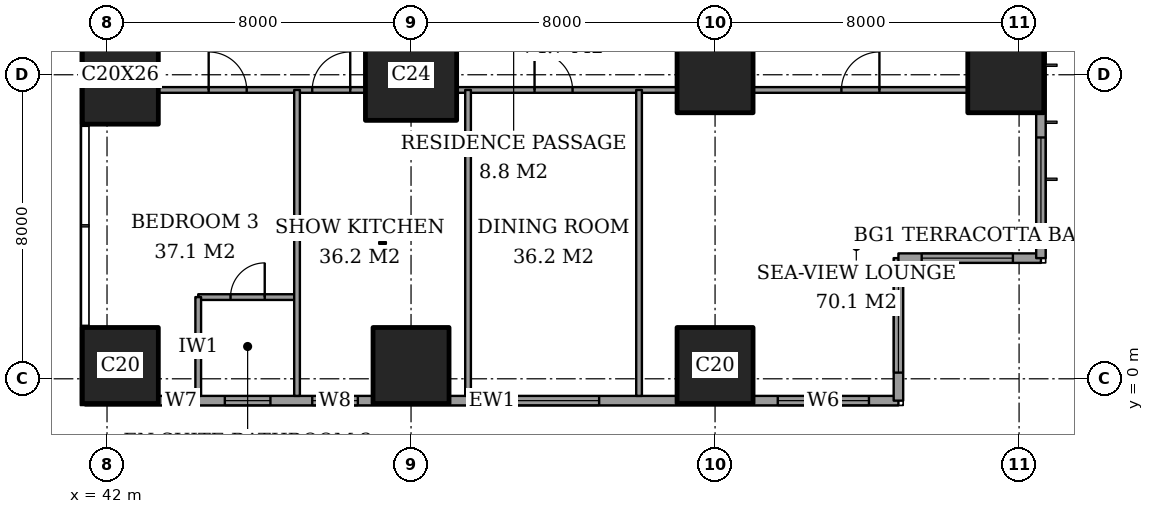
"""IFC4 building model, lengths in metres.
Left out: names, types, materials, properties, quantities, classifications, styles, units other than length and angle.
Written with IfcOpenShell. Run it as: python <this file> out.ifc"""

import sys

from ifc_helpers import new_model, si_unit, direction, frame, frame_2d, origin, origin_2d, place, context, subcontext, project, spatial, rectangle, extrude, element, fill, save


model = new_model("IFC4")
c1 = context("Model", 3, precision=1e-05, world=origin(), true_north=direction((0.0, 1.0)))
c2 = subcontext(c1, "Body", "Model", "MODEL_VIEW")
j1 = project(units=[si_unit("LENGTHUNIT", "METRE"), si_unit("PLANEANGLEUNIT", "RADIAN")], contexts=[c1])
p1 = place(None, origin())
s1 = spatial("IfcSite", under=j1, at=p1, CompositionType="ELEMENT")
p2 = place(p1, origin())
s2 = spatial("IfcBuilding", under=s1, at=p2, CompositionType="ELEMENT")
p3 = place(p2, frame((0.0, 0.0, 29.6)))
s3 = spatial("IfcBuildingStorey", under=s2, at=p3, CompositionType="ELEMENT", Elevation=29.6)
p4 = place(p3, frame((42.35, 0.35, 0.0), z_axis=(0.0, 0.0, 1.0), x_axis=(1.0, 0.0, 0.0)))
e1 = element("IfcColumn", 1, at=p4, inside=s3, PredefinedType="COLUMN", context=c2, shape_type="SweptSolid", body=[
    extrude(rectangle(XDim=2.0, YDim=2.0, at=origin_2d()), origin(), (0.0, 0.0, 1.0), 3.6),
])
p5 = place(p3, frame((42.35, 8.0, 0.0), z_axis=(0.0, 0.0, 1.0), x_axis=(1.0, 0.0, 0.0)))
e2 = element("IfcColumn", 2, at=p5, inside=s3, PredefinedType="COLUMN", context=c2, shape_type="SweptSolid", body=[
    extrude(rectangle(XDim=2.0, YDim=2.6, at=origin_2d()), origin(), (0.0, 0.0, 1.0), 3.6),
])
p6 = place(p3, frame((50.0, 0.35, 0.0), z_axis=(0.0, 0.0, 1.0), x_axis=(1.0, 0.0, 0.0)))
e3 = element("IfcColumn", 3, at=p6, inside=s3, PredefinedType="COLUMN", context=c2, shape_type="SweptSolid", body=[
    extrude(rectangle(XDim=2.0, YDim=2.0, at=origin_2d()), origin(), (0.0, 0.0, 1.0), 3.6),
])
p7 = place(p3, frame((50.0, 8.0, 0.0), z_axis=(0.0, 0.0, 1.0), x_axis=(1.0, 0.0, 0.0)))
e4 = element("IfcColumn", 4, at=p7, inside=s3, PredefinedType="COLUMN", context=c2, shape_type="SweptSolid", body=[
    extrude(rectangle(XDim=2.4, YDim=2.4, at=origin_2d()), origin(), (0.0, 0.0, 1.0), 3.6),
])
for number, where, z_axis, x_axis in (
    (5, (58.0, 0.35, 0.0), (0.0, 0.0, 1.0), (1.0, 0.0, 0.0)),
    (6, (58.0, 8.0, 0.0), (0.0, 0.0, 1.0), (1.0, 0.0, 0.0)),
    (7, (65.65, 8.0, 0.0), (0.0, 0.0, 1.0), (1.0, 0.0, 0.0)),
):
    element("IfcColumn", number, at=place(p3, frame(where, z_axis=z_axis, x_axis=x_axis)), inside=s3, PredefinedType="COLUMN", context=c2, shape_type="SweptSolid", body=[
        extrude(rectangle(XDim=2.0, YDim=2.0, at=origin_2d()), origin(), (0.0, 0.0, 1.0), 3.6),
    ])
p8 = place(p3, frame((41.425, -0.575, 0.0), z_axis=(0.0, 0.0, 1.0), x_axis=(1.0, 0.0, 0.0)))
e8 = element("IfcWall", 8, at=p8, inside=s3, PredefinedType="SOLIDWALL", context=c2, shape_type="SweptSolid", body=[
    extrude(rectangle(XDim=21.4, YDim=0.25, at=frame_2d((10.7, 0.0))), origin(), (0.0, 0.0, 1.0), 3.6),
])
p9 = place(p8, frame((2.225, 0.0, 0.6)))
e9 = element("IfcOpeningElement", 9, at=p9, cuts=e8, PredefinedType="OPENING", context=c2, shape_type="SweptSolid", body=[
    extrude(rectangle(XDim=0.6, YDim=2.0, at=frame_2d((0.3, 1.0))), frame((0.0, 0.135, 0.0), z_axis=(0.0, -1.0, 0.0), x_axis=(1.0, 0.0, 0.0)), (0.0, 0.0, 1.0), 0.27),
])
p10 = place(p8, frame((3.675, 0.0, 0.6)))
e10 = element("IfcOpeningElement", 10, at=p10, cuts=e8, PredefinedType="OPENING", context=c2, shape_type="SweptSolid", body=[
    extrude(rectangle(XDim=1.2, YDim=2.0, at=frame_2d((0.6, 1.0))), frame((0.0, 0.135, 0.0), z_axis=(0.0, -1.0, 0.0), x_axis=(1.0, 0.0, 0.0)), (0.0, 0.0, 1.0), 0.27),
])
p11 = place(p8, frame((5.975, 0.0, 0.6)))
e11 = element("IfcOpeningElement", 11, at=p11, cuts=e8, PredefinedType="OPENING", context=c2, shape_type="SweptSolid", body=[
    extrude(rectangle(XDim=1.2, YDim=2.0, at=frame_2d((0.6, 1.0))), frame((0.0, 0.135, 0.0), z_axis=(0.0, -1.0, 0.0), x_axis=(1.0, 0.0, 0.0)), (0.0, 0.0, 1.0), 0.27),
])
p12 = place(p8, frame((11.125, 0.0, 0.6)))
e12 = element("IfcOpeningElement", 12, at=p12, cuts=e8, PredefinedType="OPENING", context=c2, shape_type="SweptSolid", body=[
    extrude(rectangle(XDim=2.4, YDim=2.0, at=frame_2d((1.2, 1.0))), frame((0.0, 0.135, 0.0), z_axis=(0.0, -1.0, 0.0), x_axis=(1.0, 0.0, 0.0)), (0.0, 0.0, 1.0), 0.27),
])
p13 = place(p8, frame((18.225, 0.0, 0.6)))
e13 = element("IfcOpeningElement", 13, at=p13, cuts=e8, PredefinedType="OPENING", context=c2, shape_type="SweptSolid", body=[
    extrude(rectangle(XDim=2.4, YDim=2.0, at=frame_2d((1.2, 1.0))), frame((0.0, 0.135, 0.0), z_axis=(0.0, -1.0, 0.0), x_axis=(1.0, 0.0, 0.0)), (0.0, 0.0, 1.0), 0.27),
])
p14 = place(p3, frame((62.825, -0.575, 0.0), z_axis=(0.0, 0.0, 1.0), x_axis=(0.0, 1.0, 0.0)))
e14 = element("IfcWall", 14, at=p14, inside=s3, PredefinedType="SOLIDWALL", context=c2, shape_type="SweptSolid", body=[
    extrude(rectangle(XDim=3.75, YDim=0.25, at=frame_2d((1.875, 0.0))), origin(), (0.0, 0.0, 1.0), 3.6),
])
p15 = place(p14, frame((0.738, 0.0, 0.6)))
e15 = element("IfcOpeningElement", 15, at=p15, cuts=e14, PredefinedType="OPENING", context=c2, shape_type="SweptSolid", body=[
    extrude(rectangle(XDim=2.4, YDim=2.0, at=frame_2d((1.2, 1.0))), frame((0.0, 0.135, 0.0), z_axis=(0.0, -1.0, 0.0), x_axis=(1.0, 0.0, 0.0)), (0.0, 0.0, 1.0), 0.27),
])
p16 = place(p3, frame((62.825, 3.175, 0.0), z_axis=(0.0, 0.0, 1.0), x_axis=(1.0, 0.0, 0.0)))
e16 = element("IfcWall", 16, at=p16, inside=s3, PredefinedType="SOLIDWALL", context=c2, shape_type="SweptSolid", body=[
    extrude(rectangle(XDim=3.75, YDim=0.25, at=frame_2d((1.875, 0.0))), origin(), (0.0, 0.0, 1.0), 3.6),
])
p17 = place(p16, frame((0.613, 0.0, 0.6)))
e17 = element("IfcOpeningElement", 17, at=p17, cuts=e16, PredefinedType="OPENING", context=c2, shape_type="SweptSolid", body=[
    extrude(rectangle(XDim=2.4, YDim=2.0, at=frame_2d((1.2, 1.0))), frame((0.0, 0.135, 0.0), z_axis=(0.0, -1.0, 0.0), x_axis=(1.0, 0.0, 0.0)), (0.0, 0.0, 1.0), 0.27),
])
p18 = place(p3, frame((66.575, 3.175, 0.0), z_axis=(0.0, 0.0, 1.0), x_axis=(0.0, 1.0, 0.0)))
e18 = element("IfcWall", 18, at=p18, inside=s3, PredefinedType="SOLIDWALL", context=c2, shape_type="SweptSolid", body=[
    extrude(rectangle(XDim=41.65, YDim=0.25, at=frame_2d((20.825, 0.0))), origin(), (0.0, 0.0, 1.0), 3.6),
])
p19 = place(p18, frame((0.775, 0.0, 0.6)))
e19 = element("IfcOpeningElement", 19, at=p19, cuts=e18, PredefinedType="OPENING", context=c2, shape_type="SweptSolid", body=[
    extrude(rectangle(XDim=2.4, YDim=2.0, at=frame_2d((1.2, 1.0))), frame((0.0, 0.135, 0.0), z_axis=(0.0, -1.0, 0.0), x_axis=(1.0, 0.0, 0.0)), (0.0, 0.0, 1.0), 0.27),
])
p20 = place(p18, frame((6.1, 0.0, 0.6)))
e20 = element("IfcOpeningElement", 20, at=p20, cuts=e18, PredefinedType="OPENING", context=c2, shape_type="SweptSolid", body=[
    extrude(rectangle(XDim=1.2, YDim=2.0, at=frame_2d((0.6, 1.0))), frame((0.0, 0.135, 0.0), z_axis=(0.0, -1.0, 0.0), x_axis=(1.0, 0.0, 0.0)), (0.0, 0.0, 1.0), 0.27),
])
p21 = place(p18, frame((8.275, 0.0, 0.6)))
e21 = element("IfcOpeningElement", 21, at=p21, cuts=e18, PredefinedType="OPENING", context=c2, shape_type="SweptSolid", body=[
    extrude(rectangle(XDim=2.4, YDim=2.0, at=frame_2d((1.2, 1.0))), frame((0.0, 0.135, 0.0), z_axis=(0.0, -1.0, 0.0), x_axis=(1.0, 0.0, 0.0)), (0.0, 0.0, 1.0), 0.27),
])
p22 = place(p18, frame((15.775, 0.0, 0.6)))
e22 = element("IfcOpeningElement", 22, at=p22, cuts=e18, PredefinedType="OPENING", context=c2, shape_type="SweptSolid", body=[
    extrude(rectangle(XDim=2.4, YDim=2.0, at=frame_2d((1.2, 1.0))), frame((0.0, 0.135, 0.0), z_axis=(0.0, -1.0, 0.0), x_axis=(1.0, 0.0, 0.0)), (0.0, 0.0, 1.0), 0.27),
])
p23 = place(p18, frame((23.475, 0.0, 0.6)))
e23 = element("IfcOpeningElement", 23, at=p23, cuts=e18, PredefinedType="OPENING", context=c2, shape_type="SweptSolid", body=[
    extrude(rectangle(XDim=2.4, YDim=2.0, at=frame_2d((1.2, 1.0))), frame((0.0, 0.135, 0.0), z_axis=(0.0, -1.0, 0.0), x_axis=(1.0, 0.0, 0.0)), (0.0, 0.0, 1.0), 0.27),
])
p24 = place(p18, frame((30.975, 0.0, 0.6)))
e24 = element("IfcOpeningElement", 24, at=p24, cuts=e18, PredefinedType="OPENING", context=c2, shape_type="SweptSolid", body=[
    extrude(rectangle(XDim=2.4, YDim=2.0, at=frame_2d((1.2, 1.0))), frame((0.0, 0.135, 0.0), z_axis=(0.0, -1.0, 0.0), x_axis=(1.0, 0.0, 0.0)), (0.0, 0.0, 1.0), 0.27),
])
p25 = place(p18, frame((34.5, 0.0, 0.6)))
e25 = element("IfcOpeningElement", 25, at=p25, cuts=e18, PredefinedType="OPENING", context=c2, shape_type="SweptSolid", body=[
    extrude(rectangle(XDim=1.2, YDim=2.0, at=frame_2d((0.6, 1.0))), frame((0.0, 0.135, 0.0), z_axis=(0.0, -1.0, 0.0), x_axis=(1.0, 0.0, 0.0)), (0.0, 0.0, 1.0), 0.27),
])
p26 = place(p18, frame((38.475, 0.0, 0.6)))
e26 = element("IfcOpeningElement", 26, at=p26, cuts=e18, PredefinedType="OPENING", context=c2, shape_type="SweptSolid", body=[
    extrude(rectangle(XDim=2.4, YDim=2.0, at=frame_2d((1.2, 1.0))), frame((0.0, 0.135, 0.0), z_axis=(0.0, -1.0, 0.0), x_axis=(1.0, 0.0, 0.0)), (0.0, 0.0, 1.0), 0.27),
])
p27 = place(p3, frame((44.4, 2.15, 0.0), z_axis=(0.0, 0.0, 1.0), x_axis=(1.0, 0.0, 0.0)))
e27 = element("IfcWall", 27, at=p27, inside=s3, PredefinedType="PARTITIONING", context=c2, shape_type="SweptSolid", body=[
    extrude(rectangle(XDim=2.6, YDim=0.15, at=frame_2d((1.3, 0.0))), origin(), (0.0, 0.0, 1.0), 3.35),
])
p28 = place(p27, frame((0.85, 0.0, 0.0)))
e28 = element("IfcOpeningElement", 28, at=p28, cuts=e27, PredefinedType="OPENING", context=c2, shape_type="SweptSolid", body=[
    extrude(rectangle(XDim=0.9, YDim=2.1, at=frame_2d((0.45, 1.05))), frame((0.0, 0.085, 0.0), z_axis=(0.0, -1.0, 0.0), x_axis=(1.0, 0.0, 0.0)), (0.0, 0.0, 1.0), 0.17),
])
p29 = place(p3, frame((43.35, 7.6, 0.0), z_axis=(0.0, 0.0, 1.0), x_axis=(1.0, 0.0, 0.0)))
e29 = element("IfcWall", 29, at=p29, inside=s3, PredefinedType="PARTITIONING", context=c2, shape_type="SweptSolid", body=[
    extrude(rectangle(XDim=5.45, YDim=0.15, at=frame_2d((2.725, 0.0))), origin(), (0.0, 0.0, 1.0), 3.35),
])
p30 = place(p29, frame((4.05, 0.0, 0.0)))
e30 = element("IfcOpeningElement", 30, at=p30, cuts=e29, PredefinedType="OPENING", context=c2, shape_type="SweptSolid", body=[
    extrude(rectangle(XDim=1.0, YDim=2.1, at=frame_2d((0.5, 1.05))), frame((0.0, 0.085, 0.0), z_axis=(0.0, -1.0, 0.0), x_axis=(1.0, 0.0, 0.0)), (0.0, 0.0, 1.0), 0.17),
])
p31 = place(p29, frame((1.325, 0.0, 0.0)))
e31 = element("IfcOpeningElement", 31, at=p31, cuts=e29, PredefinedType="OPENING", context=c2, shape_type="SweptSolid", body=[
    extrude(rectangle(XDim=1.0, YDim=2.1, at=frame_2d((0.5, 1.05))), frame((0.0, 0.085, 0.0), z_axis=(0.0, -1.0, 0.0), x_axis=(1.0, 0.0, 0.0)), (0.0, 0.0, 1.0), 0.17),
])
p32 = place(p3, frame((51.2, 7.6, 0.0), z_axis=(0.0, 0.0, 1.0), x_axis=(1.0, 0.0, 0.0)))
e32 = element("IfcWall", 32, at=p32, inside=s3, PredefinedType="PARTITIONING", context=c2, shape_type="SweptSolid", body=[
    extrude(rectangle(XDim=5.8, YDim=0.15, at=frame_2d((2.9, 0.0))), origin(), (0.0, 0.0, 1.0), 3.35),
])
p33 = place(p32, frame((2.05, 0.0, 0.0)))
e33 = element("IfcOpeningElement", 33, at=p33, cuts=e32, PredefinedType="OPENING", context=c2, shape_type="SweptSolid", body=[
    extrude(rectangle(XDim=1.0, YDim=2.1, at=frame_2d((0.5, 1.05))), frame((0.0, 0.085, 0.0), z_axis=(0.0, -1.0, 0.0), x_axis=(1.0, 0.0, 0.0)), (0.0, 0.0, 1.0), 0.17),
])
p34 = place(p3, frame((59.0, 7.6, 0.0), z_axis=(0.0, 0.0, 1.0), x_axis=(1.0, 0.0, 0.0)))
e34 = element("IfcWall", 34, at=p34, inside=s3, PredefinedType="PARTITIONING", context=c2, shape_type="SweptSolid", body=[
    extrude(rectangle(XDim=5.65, YDim=0.15, at=frame_2d((2.825, 0.0))), origin(), (0.0, 0.0, 1.0), 3.35),
])
p35 = place(p34, frame((2.325, 0.0, 0.0)))
e35 = element("IfcOpeningElement", 35, at=p35, cuts=e34, PredefinedType="OPENING", context=c2, shape_type="SweptSolid", body=[
    extrude(rectangle(XDim=1.0, YDim=2.1, at=frame_2d((0.5, 1.05))), frame((0.0, 0.085, 0.0), z_axis=(0.0, -1.0, 0.0), x_axis=(1.0, 0.0, 0.0)), (0.0, 0.0, 1.0), 0.17),
])
p36 = place(p3, frame((44.4, -0.45, 0.0), z_axis=(0.0, 0.0, 1.0), x_axis=(0.0, 1.0, 0.0)))
e36 = element("IfcWall", 36, at=p36, inside=s3, PredefinedType="PARTITIONING", context=c2, shape_type="SweptSolid", body=[
    extrude(rectangle(XDim=2.6, YDim=0.15, at=frame_2d((1.3, 0.0))), origin(), (0.0, 0.0, 1.0), 3.35),
])
for number, where, z_axis, x_axis in (
    (37, (47.0, -0.45, 0.0), (0.0, 0.0, 1.0), (0.0, 1.0, 0.0)),
    (38, (51.5, -0.45, 0.0), (0.0, 0.0, 1.0), (0.0, 1.0, 0.0)),
    (39, (56.0, -0.45, 0.0), (0.0, 0.0, 1.0), (0.0, 1.0, 0.0)),
):
    element("IfcWall", number, at=place(p3, frame(where, z_axis=z_axis, x_axis=x_axis)), inside=s3, PredefinedType="PARTITIONING", context=c2, shape_type="SweptSolid", body=[
        extrude(rectangle(XDim=8.05, YDim=0.15, at=frame_2d((4.025, 0.0))), origin(), (0.0, 0.0, 1.0), 3.35),
    ])
p37 = place(p9, origin())
e40 = element("IfcWindow", 40, at=p37, inside=s3, PartitioningType="SINGLE_PANEL", PredefinedType="WINDOW", context=c2, shape_type="SweptSolid", body=[
    extrude(rectangle(XDim=0.6, YDim=2.0, at=frame_2d((0.3, 1.0))), frame((0.0, 0.03, 0.0), z_axis=(0.0, -1.0, 0.0), x_axis=(1.0, 0.0, 0.0)), (0.0, 0.0, 1.0), 0.06),
])
fill(e9, e40)
p38 = place(p10, origin())
e41 = element("IfcWindow", 41, at=p38, inside=s3, PartitioningType="SINGLE_PANEL", PredefinedType="WINDOW", context=c2, shape_type="SweptSolid", body=[
    extrude(rectangle(XDim=1.2, YDim=2.0, at=frame_2d((0.6, 1.0))), frame((0.0, 0.03, 0.0), z_axis=(0.0, -1.0, 0.0), x_axis=(1.0, 0.0, 0.0)), (0.0, 0.0, 1.0), 0.06),
])
fill(e10, e41)
p39 = place(p11, origin())
e42 = element("IfcWindow", 42, at=p39, inside=s3, PartitioningType="SINGLE_PANEL", PredefinedType="WINDOW", context=c2, shape_type="SweptSolid", body=[
    extrude(rectangle(XDim=1.2, YDim=2.0, at=frame_2d((0.6, 1.0))), frame((0.0, 0.03, 0.0), z_axis=(0.0, -1.0, 0.0), x_axis=(1.0, 0.0, 0.0)), (0.0, 0.0, 1.0), 0.06),
])
fill(e11, e42)
p40 = place(p12, origin())
e43 = element("IfcWindow", 43, at=p40, inside=s3, PartitioningType="SINGLE_PANEL", PredefinedType="WINDOW", context=c2, shape_type="SweptSolid", body=[
    extrude(rectangle(XDim=2.4, YDim=2.0, at=frame_2d((1.2, 1.0))), frame((0.0, 0.03, 0.0), z_axis=(0.0, -1.0, 0.0), x_axis=(1.0, 0.0, 0.0)), (0.0, 0.0, 1.0), 0.06),
])
fill(e12, e43)
p41 = place(p13, origin())
e44 = element("IfcWindow", 44, at=p41, inside=s3, PartitioningType="SINGLE_PANEL", PredefinedType="WINDOW", context=c2, shape_type="SweptSolid", body=[
    extrude(rectangle(XDim=2.4, YDim=2.0, at=frame_2d((1.2, 1.0))), frame((0.0, 0.03, 0.0), z_axis=(0.0, -1.0, 0.0), x_axis=(1.0, 0.0, 0.0)), (0.0, 0.0, 1.0), 0.06),
])
fill(e13, e44)
p42 = place(p15, origin())
e45 = element("IfcWindow", 45, at=p42, inside=s3, PartitioningType="SINGLE_PANEL", PredefinedType="WINDOW", context=c2, shape_type="SweptSolid", body=[
    extrude(rectangle(XDim=2.4, YDim=2.0, at=frame_2d((1.2, 1.0))), frame((0.0, 0.03, 0.0), z_axis=(0.0, -1.0, 0.0), x_axis=(1.0, 0.0, 0.0)), (0.0, 0.0, 1.0), 0.06),
])
fill(e15, e45)
p43 = place(p17, origin())
e46 = element("IfcWindow", 46, at=p43, inside=s3, PartitioningType="SINGLE_PANEL", PredefinedType="WINDOW", context=c2, shape_type="SweptSolid", body=[
    extrude(rectangle(XDim=2.4, YDim=2.0, at=frame_2d((1.2, 1.0))), frame((0.0, 0.03, 0.0), z_axis=(0.0, -1.0, 0.0), x_axis=(1.0, 0.0, 0.0)), (0.0, 0.0, 1.0), 0.06),
])
fill(e17, e46)
p44 = place(p19, origin())
e47 = element("IfcWindow", 47, at=p44, inside=s3, PartitioningType="SINGLE_PANEL", PredefinedType="WINDOW", context=c2, shape_type="SweptSolid", body=[
    extrude(rectangle(XDim=2.4, YDim=2.0, at=frame_2d((1.2, 1.0))), frame((0.0, 0.03, 0.0), z_axis=(0.0, -1.0, 0.0), x_axis=(1.0, 0.0, 0.0)), (0.0, 0.0, 1.0), 0.06),
])
fill(e19, e47)
p45 = place(p35, origin())
e48 = element("IfcDoor", 48, at=p45, inside=s3, OperationType="SINGLE_SWING_LEFT", PredefinedType="DOOR", context=c2, shape_type="SweptSolid", body=[
    extrude(rectangle(XDim=1.0, YDim=2.1, at=frame_2d((0.5, 1.05))), frame((0.0, 0.025, 0.0), z_axis=(0.0, -1.0, 0.0), x_axis=(1.0, 0.0, 0.0)), (0.0, 0.0, 1.0), 0.05),
])
fill(e35, e48)
p46 = place(p33, origin())
e49 = element("IfcDoor", 49, at=p46, inside=s3, OperationType="SINGLE_SWING_RIGHT", PredefinedType="DOOR", context=c2, shape_type="SweptSolid", body=[
    extrude(rectangle(XDim=1.0, YDim=2.1, at=frame_2d((0.5, 1.05))), frame((0.0, 0.025, 0.0), z_axis=(0.0, -1.0, 0.0), x_axis=(1.0, 0.0, 0.0)), (0.0, 0.0, 1.0), 0.05),
])
fill(e33, e49)
p47 = place(p30, origin())
e50 = element("IfcDoor", 50, at=p47, inside=s3, OperationType="SINGLE_SWING_LEFT", PredefinedType="DOOR", context=c2, shape_type="SweptSolid", body=[
    extrude(rectangle(XDim=1.0, YDim=2.1, at=frame_2d((0.5, 1.05))), frame((0.0, 0.025, 0.0), z_axis=(0.0, -1.0, 0.0), x_axis=(1.0, 0.0, 0.0)), (0.0, 0.0, 1.0), 0.05),
])
fill(e30, e50)
p48 = place(p28, origin())
e51 = element("IfcDoor", 51, at=p48, inside=s3, OperationType="SINGLE_SWING_LEFT", PredefinedType="DOOR", context=c2, shape_type="SweptSolid", body=[
    extrude(rectangle(XDim=0.9, YDim=2.1, at=frame_2d((0.45, 1.05))), frame((0.0, 0.025, 0.0), z_axis=(0.0, -1.0, 0.0), x_axis=(1.0, 0.0, 0.0)), (0.0, 0.0, 1.0), 0.05),
])
fill(e28, e51)
p49 = place(p31, origin())
e52 = element("IfcDoor", 52, at=p49, inside=s3, OperationType="SINGLE_SWING_RIGHT", PredefinedType="DOOR", context=c2, shape_type="SweptSolid", body=[
    extrude(rectangle(XDim=1.0, YDim=2.1, at=frame_2d((0.5, 1.05))), frame((0.0, 0.025, 0.0), z_axis=(0.0, -1.0, 0.0), x_axis=(1.0, 0.0, 0.0)), (0.0, 0.0, 1.0), 0.05),
])
fill(e31, e52)
save(model, sys.argv[1])
